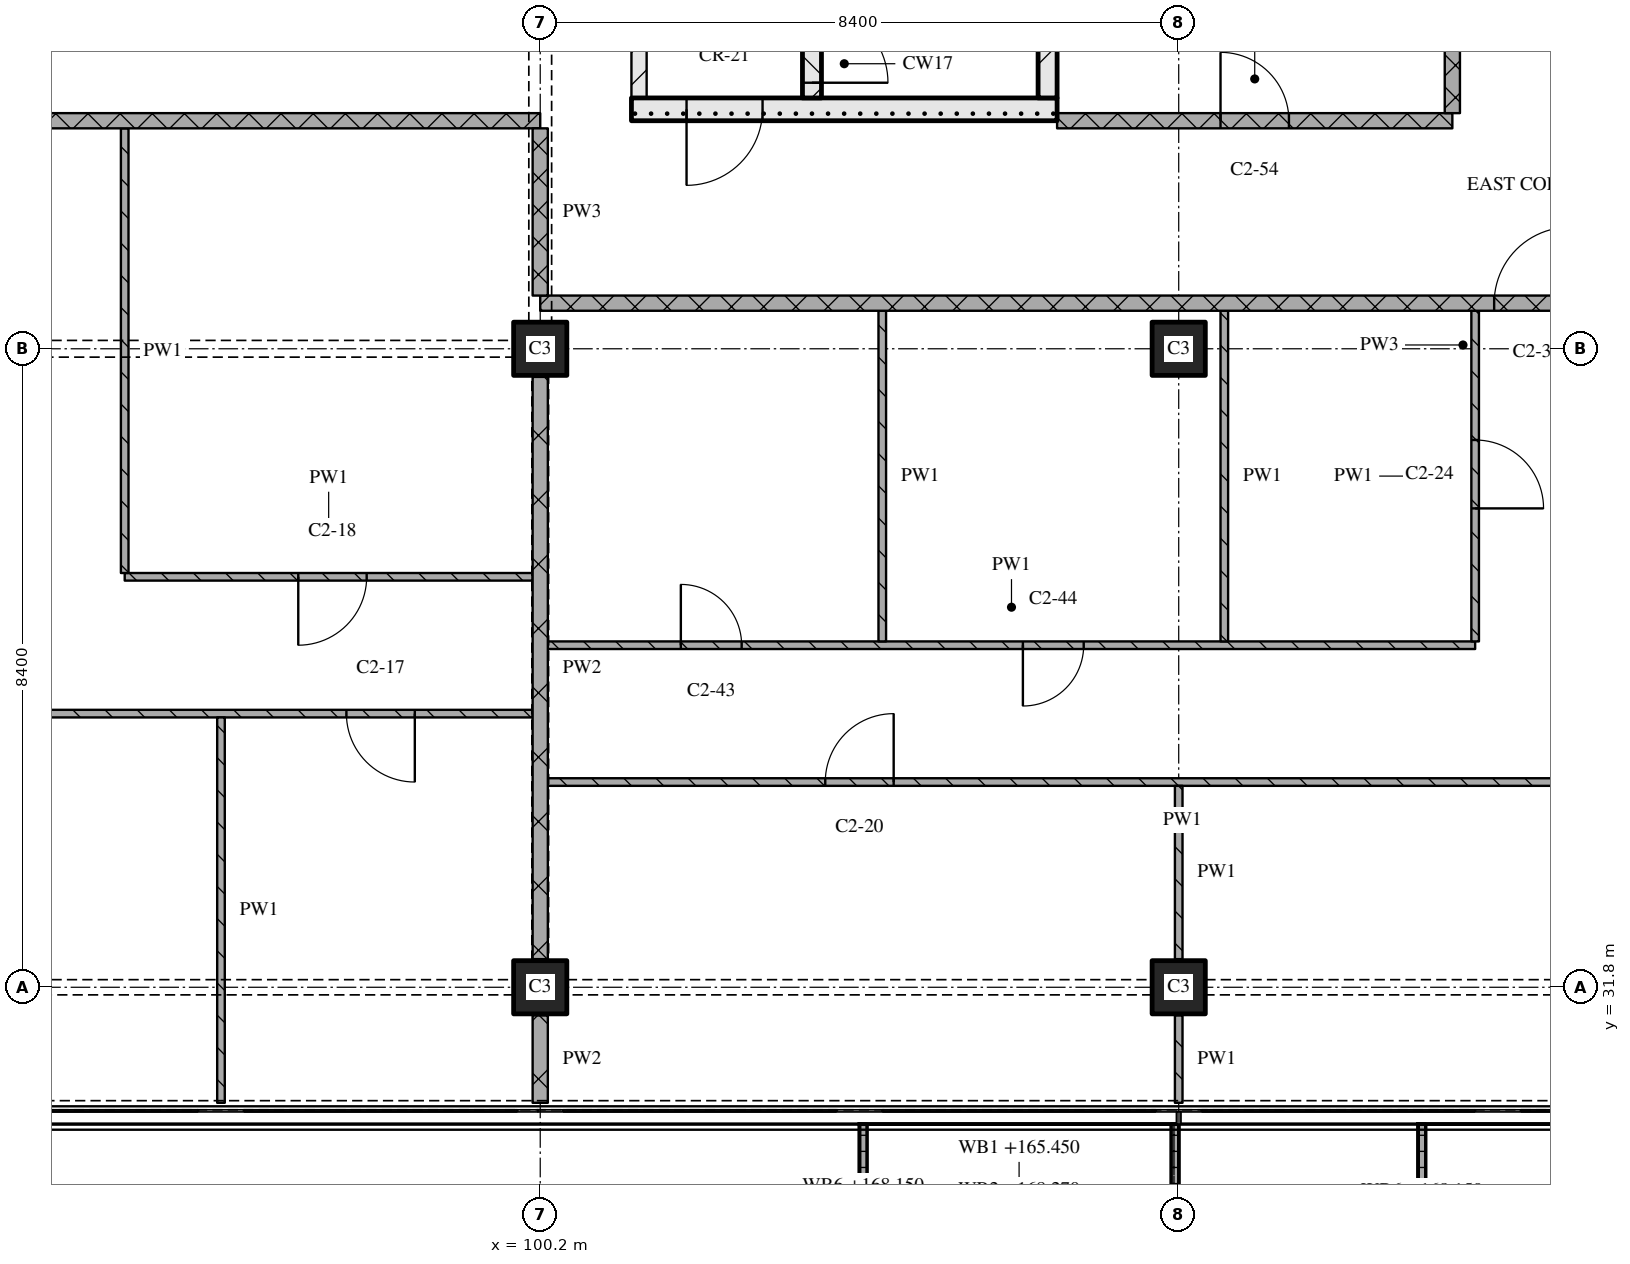
"""IFC4 building model, lengths in metres.
Left out: names, types, materials, properties, quantities, classifications, styles, units other than length and angle.
Written with IfcOpenShell. Run it as: python <this file> out.ifc"""

import sys

from ifc_helpers import new_model, si_unit, direction, frame, frame_2d, origin, origin_2d, place, context, subcontext, project, spatial, polyline, rectangle, outline, extrude, element, fill, save


model = new_model("IFC4")
c1 = context("Model", 3, precision=1e-05, world=origin(), true_north=direction((0.0, 1.0)))
c2 = subcontext(c1, "Body", "Model", "MODEL_VIEW")
j1 = project(units=[si_unit("LENGTHUNIT", "METRE"), si_unit("PLANEANGLEUNIT", "RADIAN")], contexts=[c1])
p1 = place(None, origin())
s1 = spatial("IfcSite", under=j1, at=p1, CompositionType="ELEMENT")
p2 = place(p1, origin())
s2 = spatial("IfcBuilding", under=s1, at=p2, CompositionType="ELEMENT")
p3 = place(p2, frame((0.0, 0.0, 165.45)))
s3 = spatial("IfcBuildingStorey", under=s2, at=p3, CompositionType="ELEMENT", Elevation=165.45)
for number, where, z_axis, x_axis in (
    (1, (100.2, 31.8, 0.0), (0.0, 0.0, 1.0), (1.0, 0.0, 0.0)),
    (2, (100.2, 40.2, 0.0), (0.0, 0.0, 1.0), (1.0, 0.0, 0.0)),
    (3, (108.6, 31.8, 0.0), (0.0, 0.0, 1.0), (1.0, 0.0, 0.0)),
    (4, (108.6, 40.2, 0.0), (0.0, 0.0, 1.0), (1.0, 0.0, 0.0)),
):
    element("IfcColumn", number, at=place(p3, frame(where, z_axis=z_axis, x_axis=x_axis)), inside=s3, PredefinedType="COLUMN", context=c2, shape_type="SweptSolid", body=[
        extrude(rectangle(XDim=0.7, YDim=0.7, at=origin_2d()), origin(), (0.0, 0.0, 1.0), 3.6),
    ])
p4 = place(p3, origin())
e5 = element("IfcWall", 5, at=p4, inside=s3, PredefinedType="SOLIDWALL", context=c2, shape_type="SweptSolid", body=[
    extrude(outline(polyline([(104.4, 30.0), (104.5, 30.0), (104.5, 28.367), (108.5, 28.367), (108.5, 30.0), (108.6, 30.0), (108.6, 28.267), (104.4, 28.267), (104.4, 30.0)])), origin(), (0.0, 0.0, 1.0), 1.0),
])
p5 = place(p3, origin())
e6 = element("IfcWall", 6, at=p5, inside=s3, PredefinedType="SOLIDWALL", context=c2, shape_type="SweptSolid", body=[
    extrude(outline(polyline([(111.75, 30.0), (111.85, 30.0), (111.85, 28.233), (117.95, 28.233), (117.95, 30.0), (118.05, 30.0), (118.05, 28.133), (111.75, 28.133), (111.75, 30.0)])), origin(), (0.0, 0.0, 1.0), 1.0),
])
p6 = place(p3, frame((101.4, 43.35, 0.0), z_axis=(0.0, 0.0, 1.0), x_axis=(1.0, 0.0, 0.0)))
e7 = element("IfcWall", 7, at=p6, inside=s3, PredefinedType="SOLIDWALL", context=c2, shape_type="SweptSolid", body=[
    extrude(rectangle(XDim=5.6, YDim=0.3, at=frame_2d((2.8, 0.0))), origin(), (0.0, 0.0, 1.0), 3.32),
])
p7 = place(p6, frame((0.725, 0.0, 0.0)))
e8 = element("IfcOpeningElement", 8, at=p7, cuts=e7, PredefinedType="OPENING", context=c2, shape_type="SweptSolid", body=[
    extrude(rectangle(XDim=1.0, YDim=2.1, at=frame_2d((0.5, 1.05))), frame((0.0, 0.16, 0.0), z_axis=(0.0, -1.0, 0.0), x_axis=(1.0, 0.0, 0.0)), (0.0, 0.0, 1.0), 0.32),
])
p8 = place(p3, frame((101.5, 43.5, 0.0), z_axis=(0.0, 0.0, 1.0), x_axis=(0.0, 1.0, 0.0)))
e9 = element("IfcWall", 9, at=p8, inside=s3, PredefinedType="PARTITIONING", context=c2, shape_type="SweptSolid", body=[
    extrude(rectangle(XDim=6.9, YDim=0.2, at=frame_2d((3.45, 0.0))), origin(), (0.0, 0.0, 1.0), 3.32),
])
p9 = place(p8, frame((1.0, 0.0, 0.0)))
e10 = element("IfcOpeningElement", 10, at=p9, cuts=e9, PredefinedType="OPENING", context=c2, shape_type="SweptSolid", body=[
    extrude(rectangle(XDim=1.0, YDim=2.1, at=frame_2d((0.5, 1.05))), frame((0.0, 0.11, 0.0), z_axis=(0.0, -1.0, 0.0), x_axis=(1.0, 0.0, 0.0)), (0.0, 0.0, 1.0), 0.22),
])
p10 = place(p3, frame((103.775, 43.5, 0.0), z_axis=(0.0, 0.0, 1.0), x_axis=(0.0, 1.0, 0.0)))
e11 = element("IfcWall", 11, at=p10, inside=s3, PredefinedType="SOLIDWALL", context=c2, shape_type="SweptSolid", body=[
    extrude(rectangle(XDim=6.9, YDim=0.25, at=frame_2d((3.45, 0.0))), origin(), (0.0, 0.0, 1.0), 3.32),
])
p11 = place(p10, frame((0.2, 0.0, 0.0)))
e12 = element("IfcOpeningElement", 12, at=p11, cuts=e11, PredefinedType="OPENING", context=c2, shape_type="SweptSolid", body=[
    extrude(rectangle(XDim=1.0, YDim=2.1, at=frame_2d((0.5, 1.05))), frame((0.0, 0.135, 0.0), z_axis=(0.0, -1.0, 0.0), x_axis=(1.0, 0.0, 0.0)), (0.0, 0.0, 1.0), 0.27),
])
p12 = place(p3, frame((106.875, 43.5, 0.0), z_axis=(0.0, 0.0, 1.0), x_axis=(0.0, 1.0, 0.0)))
e13 = element("IfcWall", 13, at=p12, inside=s3, PredefinedType="SOLIDWALL", context=c2, shape_type="SweptSolid", body=[
    extrude(rectangle(XDim=6.9, YDim=0.25, at=frame_2d((3.45, 0.0))), origin(), (0.0, 0.0, 1.0), 3.32),
])
p13 = place(p3, frame((117.0, 34.5, 0.0), z_axis=(0.0, 0.0, 1.0), x_axis=(-1.0, 0.0, 0.0)))
e14 = element("IfcWall", 14, at=p13, inside=s3, PredefinedType="PARTITIONING", context=c2, shape_type="SweptSolid", body=[
    extrude(rectangle(XDim=16.7, YDim=0.1, at=frame_2d((8.35, 0.0))), origin(), (0.0, 0.0, 1.0), 3.32),
])
p14 = place(p13, frame((12.15, 0.0, 0.0)))
e15 = element("IfcOpeningElement", 15, at=p14, cuts=e14, PredefinedType="OPENING", context=c2, shape_type="SweptSolid", body=[
    extrude(rectangle(XDim=0.9, YDim=2.1, at=frame_2d((0.45, 1.05))), frame((0.0, 0.06, 0.0), z_axis=(0.0, -1.0, 0.0), x_axis=(1.0, 0.0, 0.0)), (0.0, 0.0, 1.0), 0.12),
])
p15 = place(p3, frame((100.1, 35.4, 0.0), z_axis=(0.0, 0.0, 1.0), x_axis=(-1.0, 0.0, 0.0)))
e16 = element("IfcWall", 16, at=p15, inside=s3, PredefinedType="PARTITIONING", context=c2, shape_type="SweptSolid", body=[
    extrude(rectangle(XDim=20.9, YDim=0.1, at=frame_2d((10.45, 0.0))), origin(), (0.0, 0.0, 1.0), 3.32),
])
p16 = place(p15, frame((1.55, 0.0, 0.0)))
e17 = element("IfcOpeningElement", 17, at=p16, cuts=e16, PredefinedType="OPENING", context=c2, shape_type="SweptSolid", body=[
    extrude(rectangle(XDim=0.9, YDim=2.1, at=frame_2d((0.45, 1.05))), frame((0.0, 0.06, 0.0), z_axis=(0.0, -1.0, 0.0), x_axis=(1.0, 0.0, 0.0)), (0.0, 0.0, 1.0), 0.12),
])
p17 = place(p15, frame((7.85, 0.0, 0.0)))
e18 = element("IfcOpeningElement", 18, at=p17, cuts=e16, PredefinedType="OPENING", context=c2, shape_type="SweptSolid", body=[
    extrude(rectangle(XDim=0.9, YDim=2.1, at=frame_2d((0.45, 1.05))), frame((0.0, 0.06, 0.0), z_axis=(0.0, -1.0, 0.0), x_axis=(1.0, 0.0, 0.0)), (0.0, 0.0, 1.0), 0.12),
])
p18 = place(p15, frame((16.25, 0.0, 0.0)))
e19 = element("IfcOpeningElement", 19, at=p18, cuts=e16, PredefinedType="OPENING", context=c2, shape_type="SweptSolid", body=[
    extrude(rectangle(XDim=0.9, YDim=2.1, at=frame_2d((0.45, 1.05))), frame((0.0, 0.06, 0.0), z_axis=(0.0, -1.0, 0.0), x_axis=(1.0, 0.0, 0.0)), (0.0, 0.0, 1.0), 0.12),
])
p19 = place(p3, frame((100.3, 36.3, 0.0), z_axis=(0.0, 0.0, 1.0), x_axis=(1.0, 0.0, 0.0)))
e20 = element("IfcWall", 20, at=p19, inside=s3, PredefinedType="PARTITIONING", context=c2, shape_type="SweptSolid", body=[
    extrude(rectangle(XDim=12.2, YDim=0.1, at=frame_2d((6.1, 0.0))), origin(), (0.0, 0.0, 1.0), 3.32),
])
p20 = place(p19, frame((1.75, 0.0, 0.0)))
e21 = element("IfcOpeningElement", 21, at=p20, cuts=e20, PredefinedType="OPENING", context=c2, shape_type="SweptSolid", body=[
    extrude(rectangle(XDim=0.8, YDim=2.1, at=frame_2d((0.4, 1.05))), frame((0.0, 0.06, 0.0), z_axis=(0.0, -1.0, 0.0), x_axis=(1.0, 0.0, 0.0)), (0.0, 0.0, 1.0), 0.12),
])
p21 = place(p19, frame((6.25, 0.0, 0.0)))
e22 = element("IfcOpeningElement", 22, at=p21, cuts=e20, PredefinedType="OPENING", context=c2, shape_type="SweptSolid", body=[
    extrude(rectangle(XDim=0.8, YDim=2.1, at=frame_2d((0.4, 1.05))), frame((0.0, 0.06, 0.0), z_axis=(0.0, -1.0, 0.0), x_axis=(1.0, 0.0, 0.0)), (0.0, 0.0, 1.0), 0.12),
])
p22 = place(p3, frame((94.733, 37.2, 0.0), z_axis=(0.0, 0.0, 1.0), x_axis=(1.0, 0.0, 0.0)))
e23 = element("IfcWall", 23, at=p22, inside=s3, PredefinedType="PARTITIONING", context=c2, shape_type="SweptSolid", body=[
    extrude(rectangle(XDim=5.367, YDim=0.1, at=frame_2d((2.683, 0.0))), origin(), (0.0, 0.0, 1.0), 3.32),
])
p23 = place(p22, frame((2.283, 0.0, 0.0)))
e24 = element("IfcOpeningElement", 24, at=p23, cuts=e23, PredefinedType="OPENING", context=c2, shape_type="SweptSolid", body=[
    extrude(rectangle(XDim=0.9, YDim=2.1, at=frame_2d((0.45, 1.05))), frame((0.0, 0.06, 0.0), z_axis=(0.0, -1.0, 0.0), x_axis=(1.0, 0.0, 0.0)), (0.0, 0.0, 1.0), 0.12),
])
p24 = place(p3, frame((124.48, 40.8, 0.0), z_axis=(0.0, 0.0, 1.0), x_axis=(-1.0, 0.0, 0.0)))
e25 = element("IfcWall", 25, at=p24, inside=s3, PredefinedType="PARTITIONING", context=c2, shape_type="SweptSolid", body=[
    extrude(rectangle(XDim=24.28, YDim=0.2, at=frame_2d((12.14, 0.0))), origin(), (0.0, 0.0, 1.0), 3.32),
])
p25 = place(p24, frame((10.73, 0.0, 0.0)))
e26 = element("IfcOpeningElement", 26, at=p25, cuts=e25, PredefinedType="OPENING", context=c2, shape_type="SweptSolid", body=[
    extrude(rectangle(XDim=1.0, YDim=2.1, at=frame_2d((0.5, 1.05))), frame((0.0, 0.11, 0.0), z_axis=(0.0, -1.0, 0.0), x_axis=(1.0, 0.0, 0.0)), (0.0, 0.0, 1.0), 0.22),
])
p26 = place(p3, frame((100.2, 43.2, 0.0), z_axis=(0.0, 0.0, 1.0), x_axis=(-1.0, 0.0, 0.0)))
e27 = element("IfcWall", 27, at=p26, inside=s3, PredefinedType="PARTITIONING", context=c2, shape_type="SweptSolid", body=[
    extrude(rectangle(XDim=25.2, YDim=0.2, at=frame_2d((12.6, 0.0))), origin(), (0.0, 0.0, 1.0), 3.32),
])
p27 = place(p26, frame((12.55, 0.0, 0.0)))
e28 = element("IfcOpeningElement", 28, at=p27, cuts=e27, PredefinedType="OPENING", context=c2, shape_type="SweptSolid", body=[
    extrude(rectangle(XDim=1.0, YDim=2.1, at=frame_2d((0.5, 1.05))), frame((0.0, 0.11, 0.0), z_axis=(0.0, -1.0, 0.0), x_axis=(1.0, 0.0, 0.0)), (0.0, 0.0, 1.0), 0.22),
])
p28 = place(p3, frame((107.0, 43.2, 0.0), z_axis=(0.0, 0.0, 1.0), x_axis=(1.0, 0.0, 0.0)))
e29 = element("IfcWall", 29, at=p28, inside=s3, PredefinedType="PARTITIONING", context=c2, shape_type="SweptSolid", body=[
    extrude(rectangle(XDim=5.2, YDim=0.2, at=frame_2d((2.6, 0.0))), origin(), (0.0, 0.0, 1.0), 3.32),
])
p29 = place(p28, frame((2.15, 0.0, 0.0)))
e30 = element("IfcOpeningElement", 30, at=p29, cuts=e29, PredefinedType="OPENING", context=c2, shape_type="SweptSolid", body=[
    extrude(rectangle(XDim=0.9, YDim=2.1, at=frame_2d((0.45, 1.05))), frame((0.0, 0.11, 0.0), z_axis=(0.0, -1.0, 0.0), x_axis=(1.0, 0.0, 0.0)), (0.0, 0.0, 1.0), 0.22),
])
p30 = place(p3, frame((94.733, 43.1, 0.0), z_axis=(0.0, 0.0, 1.0), x_axis=(0.0, -1.0, 0.0)))
e31 = element("IfcWall", 31, at=p30, inside=s3, PredefinedType="PARTITIONING", context=c2, shape_type="SweptSolid", body=[
    extrude(rectangle(XDim=5.85, YDim=0.1, at=frame_2d((2.925, 0.0))), origin(), (0.0, 0.0, 1.0), 3.32),
])
p31 = place(p3, frame((96.0, 35.35, 0.0), z_axis=(0.0, 0.0, 1.0), x_axis=(0.0, -1.0, 0.0)))
e32 = element("IfcWall", 32, at=p31, inside=s3, PredefinedType="PARTITIONING", context=c2, shape_type="SweptSolid", body=[
    extrude(rectangle(XDim=5.07, YDim=0.1, at=frame_2d((2.535, 0.0))), origin(), (0.0, 0.0, 1.0), 3.32),
])
p32 = place(p3, frame((100.2, 43.1, 0.0), z_axis=(0.0, 0.0, 1.0), x_axis=(0.0, -1.0, 0.0)))
e33 = element("IfcWall", 33, at=p32, inside=s3, PredefinedType="PARTITIONING", context=c2, shape_type="SweptSolid", body=[
    extrude(rectangle(XDim=2.2, YDim=0.2, at=frame_2d((1.1, 0.0))), origin(), (0.0, 0.0, 1.0), 2.43),
])
p33 = place(p3, frame((100.2, 31.43, 0.0), z_axis=(0.0, 0.0, 1.0), x_axis=(0.0, -1.0, 0.0)))
e34 = element("IfcWall", 34, at=p33, inside=s3, PredefinedType="PARTITIONING", context=c2, shape_type="SweptSolid", body=[
    extrude(rectangle(XDim=1.15, YDim=0.2, at=frame_2d((0.575, 0.0))), origin(), (0.0, 0.0, 1.0), 3.32),
])
p34 = place(p3, frame((100.2, 39.83, 0.0), z_axis=(0.0, 0.0, 1.0), x_axis=(0.0, -1.0, 0.0)))
e35 = element("IfcWall", 35, at=p34, inside=s3, PredefinedType="PARTITIONING", context=c2, shape_type="SweptSolid", body=[
    extrude(rectangle(XDim=7.66, YDim=0.2, at=frame_2d((3.83, 0.0))), origin(), (0.0, 0.0, 1.0), 2.72),
])
p35 = place(p3, frame((104.7, 40.7, 0.0), z_axis=(0.0, 0.0, 1.0), x_axis=(0.0, -1.0, 0.0)))
e36 = element("IfcWall", 36, at=p35, inside=s3, PredefinedType="PARTITIONING", context=c2, shape_type="SweptSolid", body=[
    extrude(rectangle(XDim=4.35, YDim=0.1, at=frame_2d((2.175, 0.0))), origin(), (0.0, 0.0, 1.0), 3.32),
])
p36 = place(p3, frame((108.6, 31.43, 0.0), z_axis=(0.0, 0.0, 1.0), x_axis=(0.0, -1.0, 0.0)))
e37 = element("IfcWall", 37, at=p36, inside=s3, PredefinedType="PARTITIONING", context=c2, shape_type="SweptSolid", body=[
    extrude(rectangle(XDim=1.15, YDim=0.1, at=frame_2d((0.575, 0.0))), origin(), (0.0, 0.0, 1.0), 3.32),
])
p37 = place(p3, frame((108.6, 34.45, 0.0), z_axis=(0.0, 0.0, 1.0), x_axis=(0.0, -1.0, 0.0)))
e38 = element("IfcWall", 38, at=p37, inside=s3, PredefinedType="PARTITIONING", context=c2, shape_type="SweptSolid", body=[
    extrude(rectangle(XDim=2.28, YDim=0.1, at=frame_2d((1.14, 0.0))), origin(), (0.0, 0.0, 1.0), 3.32),
])
p38 = place(p3, frame((109.2, 40.7, 0.0), z_axis=(0.0, 0.0, 1.0), x_axis=(0.0, -1.0, 0.0)))
e39 = element("IfcWall", 39, at=p38, inside=s3, PredefinedType="PARTITIONING", context=c2, shape_type="SweptSolid", body=[
    extrude(rectangle(XDim=4.35, YDim=0.1, at=frame_2d((2.175, 0.0))), origin(), (0.0, 0.0, 1.0), 3.32),
])
p39 = place(p3, frame((112.2, 43.3, 0.0), z_axis=(0.0, 0.0, 1.0), x_axis=(0.0, 1.0, 0.0)))
e40 = element("IfcWall", 40, at=p39, inside=s3, PredefinedType="PARTITIONING", context=c2, shape_type="SweptSolid", body=[
    extrude(rectangle(XDim=15.4, YDim=0.2, at=frame_2d((7.7, 0.0))), origin(), (0.0, 0.0, 1.0), 3.32),
])
p40 = place(p39, frame((10.95, 0.0, 0.0)))
e41 = element("IfcOpeningElement", 41, at=p40, cuts=e40, PredefinedType="OPENING", context=c2, shape_type="SweptSolid", body=[
    extrude(rectangle(XDim=1.0, YDim=2.1, at=frame_2d((0.5, 1.05))), frame((0.0, 0.11, 0.0), z_axis=(0.0, -1.0, 0.0), x_axis=(1.0, 0.0, 0.0)), (0.0, 0.0, 1.0), 0.22),
])
p41 = place(p3, frame((112.5, 36.35, 0.0), z_axis=(0.0, 0.0, 1.0), x_axis=(0.0, 1.0, 0.0)))
e42 = element("IfcWall", 42, at=p41, inside=s3, PredefinedType="PARTITIONING", context=c2, shape_type="SweptSolid", body=[
    extrude(rectangle(XDim=4.35, YDim=0.1, at=frame_2d((2.175, 0.0))), origin(), (0.0, 0.0, 1.0), 3.32),
])
p42 = place(p41, frame((1.75, 0.0, 0.0)))
e43 = element("IfcOpeningElement", 43, at=p42, cuts=e42, PredefinedType="OPENING", context=c2, shape_type="SweptSolid", body=[
    extrude(rectangle(XDim=0.9, YDim=2.1, at=frame_2d((0.45, 1.05))), frame((0.0, 0.06, 0.0), z_axis=(0.0, -1.0, 0.0), x_axis=(1.0, 0.0, 0.0)), (0.0, 0.0, 1.0), 0.12),
])
p43 = place(p7, origin())
e44 = element("IfcDoor", 44, at=p43, inside=s3, OperationType="SINGLE_SWING_RIGHT", PredefinedType="DOOR", context=c2, shape_type="SweptSolid", body=[
    extrude(rectangle(XDim=1.0, YDim=2.1, at=frame_2d((0.5, 1.05))), frame((0.0, 0.025, 0.0), z_axis=(0.0, -1.0, 0.0), x_axis=(1.0, 0.0, 0.0)), (0.0, 0.0, 1.0), 0.05),
])
fill(e8, e44)
p44 = place(p11, origin())
e45 = element("IfcDoor", 45, at=p44, inside=s3, OperationType="SINGLE_SWING_RIGHT", PredefinedType="DOOR", context=c2, shape_type="SweptSolid", body=[
    extrude(rectangle(XDim=1.0, YDim=2.1, at=frame_2d((0.5, 1.05))), frame((0.0, 0.025, 0.0), z_axis=(0.0, -1.0, 0.0), x_axis=(1.0, 0.0, 0.0)), (0.0, 0.0, 1.0), 0.05),
])
fill(e12, e45)
p45 = place(p14, origin())
e46 = element("IfcDoor", 46, at=p45, inside=s3, OperationType="SINGLE_SWING_RIGHT", PredefinedType="DOOR", context=c2, shape_type="SweptSolid", body=[
    extrude(rectangle(XDim=0.9, YDim=2.1, at=frame_2d((0.45, 1.05))), frame((0.0, 0.025, 0.0), z_axis=(0.0, -1.0, 0.0), x_axis=(1.0, 0.0, 0.0)), (0.0, 0.0, 1.0), 0.05),
])
fill(e15, e46)
p46 = place(p16, origin())
e47 = element("IfcDoor", 47, at=p46, inside=s3, OperationType="SINGLE_SWING_LEFT", PredefinedType="DOOR", context=c2, shape_type="SweptSolid", body=[
    extrude(rectangle(XDim=0.9, YDim=2.1, at=frame_2d((0.45, 1.05))), frame((0.0, 0.025, 0.0), z_axis=(0.0, -1.0, 0.0), x_axis=(1.0, 0.0, 0.0)), (0.0, 0.0, 1.0), 0.05),
])
fill(e17, e47)
p47 = place(p20, origin())
e48 = element("IfcDoor", 48, at=p47, inside=s3, OperationType="SINGLE_SWING_LEFT", PredefinedType="DOOR", context=c2, shape_type="SweptSolid", body=[
    extrude(rectangle(XDim=0.8, YDim=2.1, at=frame_2d((0.4, 1.05))), frame((0.0, 0.025, 0.0), z_axis=(0.0, -1.0, 0.0), x_axis=(1.0, 0.0, 0.0)), (0.0, 0.0, 1.0), 0.05),
])
fill(e21, e48)
p48 = place(p21, origin())
e49 = element("IfcDoor", 49, at=p48, inside=s3, OperationType="SINGLE_SWING_RIGHT", PredefinedType="DOOR", context=c2, shape_type="SweptSolid", body=[
    extrude(rectangle(XDim=0.8, YDim=2.1, at=frame_2d((0.4, 1.05))), frame((0.0, 0.025, 0.0), z_axis=(0.0, -1.0, 0.0), x_axis=(1.0, 0.0, 0.0)), (0.0, 0.0, 1.0), 0.05),
])
fill(e22, e49)
p49 = place(p23, origin())
e50 = element("IfcDoor", 50, at=p49, inside=s3, OperationType="SINGLE_SWING_RIGHT", PredefinedType="DOOR", context=c2, shape_type="SweptSolid", body=[
    extrude(rectangle(XDim=0.9, YDim=2.1, at=frame_2d((0.45, 1.05))), frame((0.0, 0.025, 0.0), z_axis=(0.0, -1.0, 0.0), x_axis=(1.0, 0.0, 0.0)), (0.0, 0.0, 1.0), 0.05),
])
fill(e24, e50)
p50 = place(p25, origin())
e51 = element("IfcDoor", 51, at=p50, inside=s3, OperationType="SINGLE_SWING_RIGHT", PredefinedType="DOOR", context=c2, shape_type="SweptSolid", body=[
    extrude(rectangle(XDim=1.0, YDim=2.1, at=frame_2d((0.5, 1.05))), frame((0.0, 0.025, 0.0), z_axis=(0.0, -1.0, 0.0), x_axis=(1.0, 0.0, 0.0)), (0.0, 0.0, 1.0), 0.05),
])
fill(e26, e51)
p51 = place(p29, origin())
e52 = element("IfcDoor", 52, at=p51, inside=s3, OperationType="SINGLE_SWING_LEFT", PredefinedType="DOOR", context=c2, shape_type="SweptSolid", body=[
    extrude(rectangle(XDim=0.9, YDim=2.1, at=frame_2d((0.45, 1.05))), frame((0.0, 0.025, 0.0), z_axis=(0.0, -1.0, 0.0), x_axis=(1.0, 0.0, 0.0)), (0.0, 0.0, 1.0), 0.05),
])
fill(e30, e52)
p52 = place(p42, origin())
e53 = element("IfcDoor", 53, at=p52, inside=s3, OperationType="SINGLE_SWING_RIGHT", PredefinedType="DOOR", context=c2, shape_type="SweptSolid", body=[
    extrude(rectangle(XDim=0.9, YDim=2.1, at=frame_2d((0.45, 1.05))), frame((0.0, 0.025, 0.0), z_axis=(0.0, -1.0, 0.0), x_axis=(1.0, 0.0, 0.0)), (0.0, 0.0, 1.0), 0.05),
])
fill(e43, e53)
save(model, sys.argv[1])
